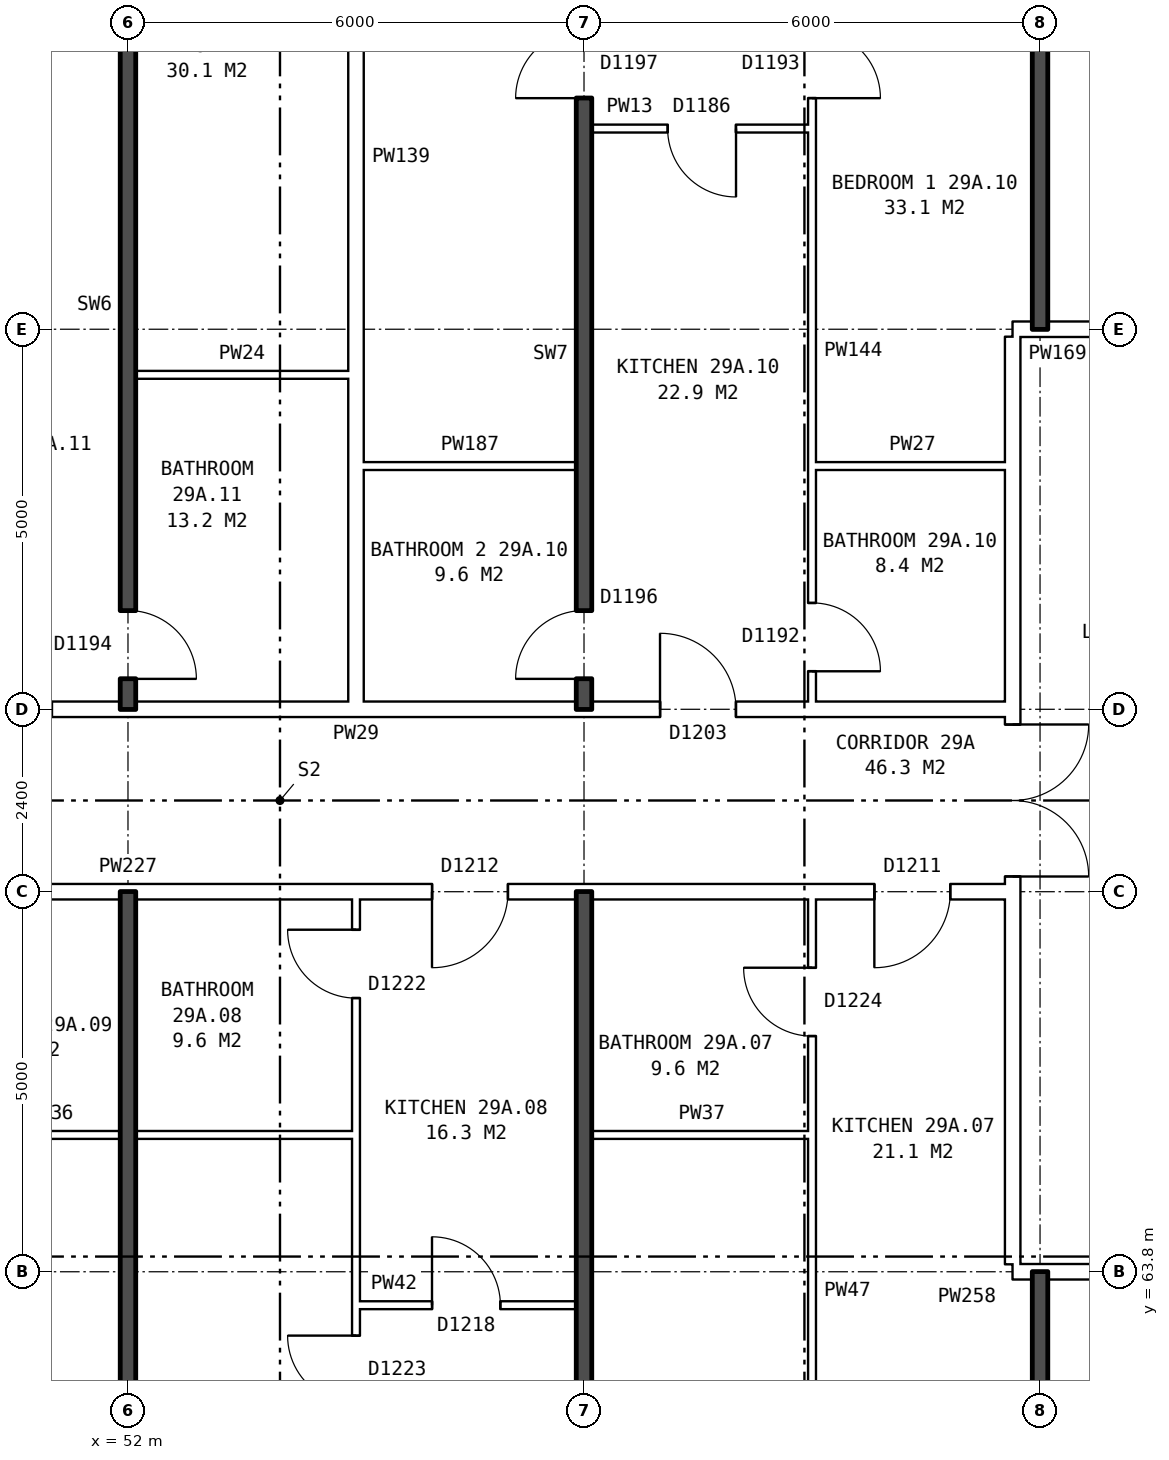
"""IFC4 building model, lengths in metres.
Left out: names, types, materials, properties, quantities, classifications, styles, units other than length and angle.
Written with IfcOpenShell. Run it as: python <this file> out.ifc"""

import sys

from ifc_helpers import new_model, si_unit, direction, frame, frame_2d, origin, place, context, subcontext, project, spatial, rectangle, extrude, element, fill, save


model = new_model("IFC4")
c1 = context("Model", 3, precision=1e-05, world=origin(), true_north=direction((0.0, 1.0)))
c2 = subcontext(c1, "Body", "Model", "MODEL_VIEW")
j1 = project(units=[si_unit("LENGTHUNIT", "METRE"), si_unit("PLANEANGLEUNIT", "RADIAN")], contexts=[c1])
p1 = place(None, origin())
s1 = spatial("IfcSite", under=j1, at=p1, CompositionType="ELEMENT")
p2 = place(p1, origin())
s2 = spatial("IfcBuilding", under=s1, at=p2, CompositionType="ELEMENT")
p3 = place(p2, frame((0.0, 0.0, 105.7)))
s3 = spatial("IfcBuildingStorey", under=s2, at=p3, CompositionType="ELEMENT", Elevation=105.7)
p4 = place(p3, frame((63.64, 63.9, 0.0), z_axis=(0.0, 0.0, 1.0), x_axis=(0.0, 1.0, 0.0)))
e1 = element("IfcWall", 1, at=p4, inside=s3, PredefinedType="PARTITIONING", context=c2, shape_type="SweptSolid", body=[
    extrude(rectangle(XDim=12.2, YDim=0.2, at=frame_2d((6.1, 0.0))), origin(), (0.0, 0.0, 1.0), 2.85),
])
p5 = place(p4, frame((5.1, 0.0, 0.0)))
e2 = element("IfcOpeningElement", 2, at=p5, cuts=e1, PredefinedType="OPENING", context=c2, shape_type="SweptSolid", body=[
    extrude(rectangle(XDim=2.0, YDim=2.1, at=frame_2d((1.0, 1.05))), frame((0.0, 0.11, 0.0), z_axis=(0.0, -1.0, 0.0), x_axis=(1.0, 0.0, 0.0)), (0.0, 0.0, 1.0), 0.22),
])
p6 = place(p3, frame((55.0, 63.36, 0.0), z_axis=(0.0, 0.0, 1.0), x_axis=(1.0, 0.0, 0.0)))
e3 = element("IfcWall", 3, at=p6, inside=s3, PredefinedType="PARTITIONING", context=c2, shape_type="SweptSolid", body=[
    extrude(rectangle(XDim=2.9, YDim=0.1, at=frame_2d((1.45, 0.0))), origin(), (0.0, 0.0, 1.0), 2.85),
])
p7 = place(p6, frame((1.0, 0.0, 0.0)))
e4 = element("IfcOpeningElement", 4, at=p7, cuts=e3, PredefinedType="OPENING", context=c2, shape_type="SweptSolid", body=[
    extrude(rectangle(XDim=0.9, YDim=2.1, at=frame_2d((0.45, 1.05))), frame((0.0, 0.06, 0.0), z_axis=(0.0, -1.0, 0.0), x_axis=(1.0, 0.0, 0.0)), (0.0, 0.0, 1.0), 0.12),
])
p8 = place(p3, frame((63.64, 63.8, 0.0), z_axis=(0.0, 0.0, 1.0), x_axis=(1.0, 0.0, 0.0)))
e5 = element("IfcWall", 5, at=p8, inside=s3, PredefinedType="PARTITIONING", context=c2, shape_type="SweptSolid", body=[
    extrude(rectangle(XDim=3.0, YDim=0.2, at=frame_2d((1.5, 0.0))), origin(), (0.0, 0.0, 1.0), 2.85),
])
p9 = place(p8, frame((1.18, 0.0, 0.0)))
e6 = element("IfcOpeningElement", 6, at=p9, cuts=e5, PredefinedType="OPENING", context=c2, shape_type="SweptSolid", body=[
    extrude(rectangle(XDim=1.0, YDim=2.1, at=frame_2d((0.5, 1.05))), frame((0.0, 0.11, 0.0), z_axis=(0.0, -1.0, 0.0), x_axis=(1.0, 0.0, 0.0)), (0.0, 0.0, 1.0), 0.22),
])
p10 = place(p3, frame((49.0, 65.6, 0.0), z_axis=(0.0, 0.0, 1.0), x_axis=(1.0, 0.0, 0.0)))
e7 = element("IfcWall", 7, at=p10, inside=s3, PredefinedType="PARTITIONING", context=c2, shape_type="SweptSolid", body=[
    extrude(rectangle(XDim=6.0, YDim=0.1, at=frame_2d((3.0, 0.0))), origin(), (0.0, 0.0, 1.0), 2.85),
])
p11 = place(p3, frame((58.1, 65.6, 0.0), z_axis=(0.0, 0.0, 1.0), x_axis=(1.0, 0.0, 0.0)))
e8 = element("IfcWall", 8, at=p11, inside=s3, PredefinedType="PARTITIONING", context=c2, shape_type="SweptSolid", body=[
    extrude(rectangle(XDim=2.9, YDim=0.1, at=frame_2d((1.45, 0.0))), origin(), (0.0, 0.0, 1.0), 2.85),
])
p12 = place(p3, frame((44.36, 68.8, 0.0), z_axis=(0.0, 0.0, 1.0), x_axis=(1.0, 0.0, 0.0)))
e9 = element("IfcWall", 9, at=p12, inside=s3, PredefinedType="PARTITIONING", context=c2, shape_type="SweptSolid", body=[
    extrude(rectangle(XDim=19.28, YDim=0.2, at=frame_2d((9.64, 0.0))), origin(), (0.0, 0.0, 1.0), 2.85),
])
p13 = place(p12, frame((17.46, 0.0, 0.0)))
e10 = element("IfcOpeningElement", 10, at=p13, cuts=e9, PredefinedType="OPENING", context=c2, shape_type="SweptSolid", body=[
    extrude(rectangle(XDim=1.0, YDim=2.1, at=frame_2d((0.5, 1.05))), frame((0.0, 0.11, 0.0), z_axis=(0.0, -1.0, 0.0), x_axis=(1.0, 0.0, 0.0)), (0.0, 0.0, 1.0), 0.22),
])
p14 = place(p12, frame((11.64, 0.0, 0.0)))
e11 = element("IfcOpeningElement", 11, at=p14, cuts=e9, PredefinedType="OPENING", context=c2, shape_type="SweptSolid", body=[
    extrude(rectangle(XDim=1.0, YDim=2.1, at=frame_2d((0.5, 1.05))), frame((0.0, 0.11, 0.0), z_axis=(0.0, -1.0, 0.0), x_axis=(1.0, 0.0, 0.0)), (0.0, 0.0, 1.0), 0.22),
])
p15 = place(p12, frame((2.64, 0.0, 0.0)))
e12 = element("IfcOpeningElement", 12, at=p15, cuts=e9, PredefinedType="OPENING", context=c2, shape_type="SweptSolid", body=[
    extrude(rectangle(XDim=1.0, YDim=2.1, at=frame_2d((0.5, 1.05))), frame((0.0, 0.11, 0.0), z_axis=(0.0, -1.0, 0.0), x_axis=(1.0, 0.0, 0.0)), (0.0, 0.0, 1.0), 0.22),
])
p16 = place(p3, frame((44.36, 71.2, 0.0), z_axis=(0.0, 0.0, 1.0), x_axis=(1.0, 0.0, 0.0)))
e13 = element("IfcWall", 13, at=p16, inside=s3, PredefinedType="PARTITIONING", context=c2, shape_type="SweptSolid", body=[
    extrude(rectangle(XDim=19.28, YDim=0.2, at=frame_2d((9.64, 0.0))), origin(), (0.0, 0.0, 1.0), 2.85),
])
p17 = place(p16, frame((14.64, 0.0, 0.0)))
e14 = element("IfcOpeningElement", 14, at=p17, cuts=e13, PredefinedType="OPENING", context=c2, shape_type="SweptSolid", body=[
    extrude(rectangle(XDim=1.0, YDim=2.1, at=frame_2d((0.5, 1.05))), frame((0.0, 0.11, 0.0), z_axis=(0.0, -1.0, 0.0), x_axis=(1.0, 0.0, 0.0)), (0.0, 0.0, 1.0), 0.22),
])
p18 = place(p16, frame((5.64, 0.0, 0.0)))
e15 = element("IfcOpeningElement", 15, at=p18, cuts=e13, PredefinedType="OPENING", context=c2, shape_type="SweptSolid", body=[
    extrude(rectangle(XDim=1.0, YDim=2.1, at=frame_2d((0.5, 1.05))), frame((0.0, 0.11, 0.0), z_axis=(0.0, -1.0, 0.0), x_axis=(1.0, 0.0, 0.0)), (0.0, 0.0, 1.0), 0.22),
])
p19 = place(p3, frame((55.1, 74.4, 0.0), z_axis=(0.0, 0.0, 1.0), x_axis=(1.0, 0.0, 0.0)))
e16 = element("IfcWall", 16, at=p19, inside=s3, PredefinedType="PARTITIONING", context=c2, shape_type="SweptSolid", body=[
    extrude(rectangle(XDim=2.8, YDim=0.1, at=frame_2d((1.4, 0.0))), origin(), (0.0, 0.0, 1.0), 2.85),
])
p20 = place(p3, frame((61.0, 74.4, 0.0), z_axis=(0.0, 0.0, 1.0), x_axis=(1.0, 0.0, 0.0)))
e17 = element("IfcWall", 17, at=p20, inside=s3, PredefinedType="PARTITIONING", context=c2, shape_type="SweptSolid", body=[
    extrude(rectangle(XDim=2.64, YDim=0.1, at=frame_2d((1.32, 0.0))), origin(), (0.0, 0.0, 1.0), 2.85),
])
p21 = place(p3, frame((52.1, 75.6, 0.0), z_axis=(0.0, 0.0, 1.0), x_axis=(1.0, 0.0, 0.0)))
e18 = element("IfcWall", 18, at=p21, inside=s3, PredefinedType="PARTITIONING", context=c2, shape_type="SweptSolid", body=[
    extrude(rectangle(XDim=2.8, YDim=0.1, at=frame_2d((1.4, 0.0))), origin(), (0.0, 0.0, 1.0), 2.85),
])
p22 = place(p3, frame((63.64, 76.2, 0.0), z_axis=(0.0, 0.0, 1.0), x_axis=(1.0, 0.0, 0.0)))
e19 = element("IfcWall", 19, at=p22, inside=s3, PredefinedType="PARTITIONING", context=c2, shape_type="SweptSolid", body=[
    extrude(rectangle(XDim=3.0, YDim=0.2, at=frame_2d((1.5, 0.0))), origin(), (0.0, 0.0, 1.0), 2.85),
])
p23 = place(p22, frame((1.18, 0.0, 0.0)))
e20 = element("IfcOpeningElement", 20, at=p23, cuts=e19, PredefinedType="OPENING", context=c2, shape_type="SweptSolid", body=[
    extrude(rectangle(XDim=1.0, YDim=2.1, at=frame_2d((0.5, 1.05))), frame((0.0, 0.11, 0.0), z_axis=(0.0, -1.0, 0.0), x_axis=(1.0, 0.0, 0.0)), (0.0, 0.0, 1.0), 0.22),
])
p24 = place(p3, frame((58.1, 78.84, 0.0), z_axis=(0.0, 0.0, 1.0), x_axis=(1.0, 0.0, 0.0)))
e21 = element("IfcWall", 21, at=p24, inside=s3, PredefinedType="PARTITIONING", context=c2, shape_type="SweptSolid", body=[
    extrude(rectangle(XDim=2.9, YDim=0.1, at=frame_2d((1.45, 0.0))), origin(), (0.0, 0.0, 1.0), 2.85),
])
p25 = place(p24, frame((1.0, 0.0, 0.0)))
e22 = element("IfcOpeningElement", 22, at=p25, cuts=e21, PredefinedType="OPENING", context=c2, shape_type="SweptSolid", body=[
    extrude(rectangle(XDim=0.9, YDim=2.1, at=frame_2d((0.45, 1.05))), frame((0.0, 0.06, 0.0), z_axis=(0.0, -1.0, 0.0), x_axis=(1.0, 0.0, 0.0)), (0.0, 0.0, 1.0), 0.12),
])
p26 = place(p3, frame((52.0, 54.36, 0.0), z_axis=(0.0, 0.0, 1.0), x_axis=(0.0, 1.0, 0.0)))
e23 = element("IfcWall", 23, at=p26, inside=s3, PredefinedType="SOLIDWALL", context=c2, shape_type="SweptSolid", body=[
    extrude(rectangle(XDim=14.44, YDim=0.2, at=frame_2d((7.22, 0.0))), origin(), (0.0, 0.0, 1.0), 2.85),
])
p27 = place(p3, frame((52.0, 71.2, 0.0), z_axis=(0.0, 0.0, 1.0), x_axis=(0.0, 1.0, 0.0)))
e24 = element("IfcWall", 24, at=p27, inside=s3, PredefinedType="SOLIDWALL", context=c2, shape_type="SweptSolid", body=[
    extrude(rectangle(XDim=14.44, YDim=0.2, at=frame_2d((7.22, 0.0))), origin(), (0.0, 0.0, 1.0), 2.85),
])
p28 = place(p27, frame((9.34, 0.0, 0.0)))
e25 = element("IfcOpeningElement", 25, at=p28, cuts=e24, PredefinedType="OPENING", context=c2, shape_type="SweptSolid", body=[
    extrude(rectangle(XDim=0.9, YDim=2.1, at=frame_2d((0.45, 1.05))), frame((0.0, 0.11, 0.0), z_axis=(0.0, -1.0, 0.0), x_axis=(1.0, 0.0, 0.0)), (0.0, 0.0, 1.0), 0.22),
])
p29 = place(p27, frame((0.4, 0.0, 0.0)))
e26 = element("IfcOpeningElement", 26, at=p29, cuts=e24, PredefinedType="OPENING", context=c2, shape_type="SweptSolid", body=[
    extrude(rectangle(XDim=0.9, YDim=2.1, at=frame_2d((0.45, 1.05))), frame((0.0, 0.11, 0.0), z_axis=(0.0, -1.0, 0.0), x_axis=(1.0, 0.0, 0.0)), (0.0, 0.0, 1.0), 0.22),
])
p30 = place(p3, frame((55.0, 54.36, 0.0), z_axis=(0.0, 0.0, 1.0), x_axis=(0.0, 1.0, 0.0)))
e27 = element("IfcWall", 27, at=p30, inside=s3, PredefinedType="PARTITIONING", context=c2, shape_type="SweptSolid", body=[
    extrude(rectangle(XDim=14.34, YDim=0.1, at=frame_2d((7.17, 0.0))), origin(), (0.0, 0.0, 1.0), 2.85),
])
p31 = place(p30, frame((7.7, 0.0, 0.0)))
e28 = element("IfcOpeningElement", 28, at=p31, cuts=e27, PredefinedType="OPENING", context=c2, shape_type="SweptSolid", body=[
    extrude(rectangle(XDim=0.9, YDim=2.1, at=frame_2d((0.45, 1.05))), frame((0.0, 0.06, 0.0), z_axis=(0.0, -1.0, 0.0), x_axis=(1.0, 0.0, 0.0)), (0.0, 0.0, 1.0), 0.12),
])
p32 = place(p30, frame((13.04, 0.0, 0.0)))
e29 = element("IfcOpeningElement", 29, at=p32, cuts=e27, PredefinedType="OPENING", context=c2, shape_type="SweptSolid", body=[
    extrude(rectangle(XDim=0.9, YDim=2.1, at=frame_2d((0.45, 1.05))), frame((0.0, 0.06, 0.0), z_axis=(0.0, -1.0, 0.0), x_axis=(1.0, 0.0, 0.0)), (0.0, 0.0, 1.0), 0.12),
])
p33 = place(p3, frame((55.0, 71.3, 0.0), z_axis=(0.0, 0.0, 1.0), x_axis=(0.0, 1.0, 0.0)))
e30 = element("IfcWall", 30, at=p33, inside=s3, PredefinedType="PARTITIONING", context=c2, shape_type="SweptSolid", body=[
    extrude(rectangle(XDim=14.34, YDim=0.2, at=frame_2d((7.17, 0.0))), origin(), (0.0, 0.0, 1.0), 2.85),
])
p34 = place(p3, frame((58.0, 54.36, 0.0), z_axis=(0.0, 0.0, 1.0), x_axis=(0.0, 1.0, 0.0)))
e31 = element("IfcWall", 31, at=p34, inside=s3, PredefinedType="SOLIDWALL", context=c2, shape_type="SweptSolid", body=[
    extrude(rectangle(XDim=14.44, YDim=0.2, at=frame_2d((7.22, 0.0))), origin(), (0.0, 0.0, 1.0), 2.85),
])
p35 = place(p3, frame((58.0, 71.2, 0.0), z_axis=(0.0, 0.0, 1.0), x_axis=(0.0, 1.0, 0.0)))
e32 = element("IfcWall", 32, at=p35, inside=s3, PredefinedType="SOLIDWALL", context=c2, shape_type="SweptSolid", body=[
    extrude(rectangle(XDim=14.44, YDim=0.2, at=frame_2d((7.22, 0.0))), origin(), (0.0, 0.0, 1.0), 2.85),
])
p36 = place(p35, frame((8.04, 0.0, 0.0)))
e33 = element("IfcOpeningElement", 33, at=p36, cuts=e32, PredefinedType="OPENING", context=c2, shape_type="SweptSolid", body=[
    extrude(rectangle(XDim=0.9, YDim=2.1, at=frame_2d((0.45, 1.05))), frame((0.0, 0.11, 0.0), z_axis=(0.0, -1.0, 0.0), x_axis=(1.0, 0.0, 0.0)), (0.0, 0.0, 1.0), 0.22),
])
p37 = place(p35, frame((0.4, 0.0, 0.0)))
e34 = element("IfcOpeningElement", 34, at=p37, cuts=e32, PredefinedType="OPENING", context=c2, shape_type="SweptSolid", body=[
    extrude(rectangle(XDim=0.9, YDim=2.1, at=frame_2d((0.45, 1.05))), frame((0.0, 0.11, 0.0), z_axis=(0.0, -1.0, 0.0), x_axis=(1.0, 0.0, 0.0)), (0.0, 0.0, 1.0), 0.22),
])
p38 = place(p3, frame((61.0, 54.36, 0.0), z_axis=(0.0, 0.0, 1.0), x_axis=(0.0, 1.0, 0.0)))
e35 = element("IfcWall", 35, at=p38, inside=s3, PredefinedType="PARTITIONING", context=c2, shape_type="SweptSolid", body=[
    extrude(rectangle(XDim=14.34, YDim=0.1, at=frame_2d((7.17, 0.0))), origin(), (0.0, 0.0, 1.0), 2.85),
])
p39 = place(p38, frame((5.5, 0.0, 0.0)))
e36 = element("IfcOpeningElement", 36, at=p39, cuts=e35, PredefinedType="OPENING", context=c2, shape_type="SweptSolid", body=[
    extrude(rectangle(XDim=0.9, YDim=2.1, at=frame_2d((0.45, 1.05))), frame((0.0, 0.06, 0.0), z_axis=(0.0, -1.0, 0.0), x_axis=(1.0, 0.0, 0.0)), (0.0, 0.0, 1.0), 0.12),
])
p40 = place(p38, frame((12.54, 0.0, 0.0)))
e37 = element("IfcOpeningElement", 37, at=p40, cuts=e35, PredefinedType="OPENING", context=c2, shape_type="SweptSolid", body=[
    extrude(rectangle(XDim=0.9, YDim=2.1, at=frame_2d((0.45, 1.05))), frame((0.0, 0.06, 0.0), z_axis=(0.0, -1.0, 0.0), x_axis=(1.0, 0.0, 0.0)), (0.0, 0.0, 1.0), 0.12),
])
p41 = place(p3, frame((61.0, 71.3, 0.0), z_axis=(0.0, 0.0, 1.0), x_axis=(0.0, 1.0, 0.0)))
e38 = element("IfcWall", 38, at=p41, inside=s3, PredefinedType="PARTITIONING", context=c2, shape_type="SweptSolid", body=[
    extrude(rectangle(XDim=14.34, YDim=0.1, at=frame_2d((7.17, 0.0))), origin(), (0.0, 0.0, 1.0), 2.85),
])
p42 = place(p41, frame((7.94, 0.0, 0.0)))
e39 = element("IfcOpeningElement", 39, at=p42, cuts=e38, PredefinedType="OPENING", context=c2, shape_type="SweptSolid", body=[
    extrude(rectangle(XDim=0.9, YDim=2.1, at=frame_2d((0.45, 1.05))), frame((0.0, 0.06, 0.0), z_axis=(0.0, -1.0, 0.0), x_axis=(1.0, 0.0, 0.0)), (0.0, 0.0, 1.0), 0.12),
])
p43 = place(p41, frame((0.4, 0.0, 0.0)))
e40 = element("IfcOpeningElement", 40, at=p43, cuts=e38, PredefinedType="OPENING", context=c2, shape_type="SweptSolid", body=[
    extrude(rectangle(XDim=0.9, YDim=2.1, at=frame_2d((0.45, 1.05))), frame((0.0, 0.06, 0.0), z_axis=(0.0, -1.0, 0.0), x_axis=(1.0, 0.0, 0.0)), (0.0, 0.0, 1.0), 0.12),
])
for number, where, z_axis, x_axis in (
    (41, (64.0, 54.36, 0.0), (0.0, 0.0, 1.0), (0.0, 1.0, 0.0)),
    (42, (64.0, 76.2, 0.0), (0.0, 0.0, 1.0), (0.0, 1.0, 0.0)),
):
    element("IfcWall", number, at=place(p3, frame(where, z_axis=z_axis, x_axis=x_axis)), inside=s3, PredefinedType="SOLIDWALL", context=c2, shape_type="SweptSolid", body=[
        extrude(rectangle(XDim=9.44, YDim=0.2, at=frame_2d((4.72, 0.0))), origin(), (0.0, 0.0, 1.0), 2.85),
    ])
p44 = place(p5, frame((2.0, 0.0, 0.0), z_axis=(0.0, 0.0, 1.0), x_axis=(-1.0, 0.0, 0.0)))
e43 = element("IfcDoor", 43, at=p44, inside=s3, OperationType="DOUBLE_DOOR_SINGLE_SWING", PredefinedType="DOOR", context=c2, shape_type="SweptSolid", body=[
    extrude(rectangle(XDim=2.0, YDim=2.1, at=frame_2d((1.0, 1.05))), frame((0.0, 0.025, 0.0), z_axis=(0.0, -1.0, 0.0), x_axis=(1.0, 0.0, 0.0)), (0.0, 0.0, 1.0), 0.05),
])
fill(e2, e43)
p45 = place(p13, frame((1.0, 0.0, 0.0), z_axis=(0.0, 0.0, 1.0), x_axis=(-1.0, 0.0, 0.0)))
e44 = element("IfcDoor", 44, at=p45, inside=s3, OperationType="SINGLE_SWING_RIGHT", PredefinedType="DOOR", context=c2, shape_type="SweptSolid", body=[
    extrude(rectangle(XDim=1.0, YDim=2.1, at=frame_2d((0.5, 1.05))), frame((0.0, 0.025, 0.0), z_axis=(0.0, -1.0, 0.0), x_axis=(1.0, 0.0, 0.0)), (0.0, 0.0, 1.0), 0.05),
])
fill(e10, e44)
p46 = place(p40, origin())
e45 = element("IfcDoor", 45, at=p46, inside=s3, OperationType="SINGLE_SWING_RIGHT", PredefinedType="DOOR", context=c2, shape_type="SweptSolid", body=[
    extrude(rectangle(XDim=0.9, YDim=2.1, at=frame_2d((0.45, 1.05))), frame((0.0, 0.025, 0.0), z_axis=(0.0, -1.0, 0.0), x_axis=(1.0, 0.0, 0.0)), (0.0, 0.0, 1.0), 0.05),
])
fill(e37, e45)
p47 = place(p31, origin())
e46 = element("IfcDoor", 46, at=p47, inside=s3, OperationType="SINGLE_SWING_RIGHT", PredefinedType="DOOR", context=c2, shape_type="SweptSolid", body=[
    extrude(rectangle(XDim=0.9, YDim=2.1, at=frame_2d((0.45, 1.05))), frame((0.0, 0.025, 0.0), z_axis=(0.0, -1.0, 0.0), x_axis=(1.0, 0.0, 0.0)), (0.0, 0.0, 1.0), 0.05),
])
fill(e28, e46)
p48 = place(p14, frame((1.0, 0.0, 0.0), z_axis=(0.0, 0.0, 1.0), x_axis=(-1.0, 0.0, 0.0)))
e47 = element("IfcDoor", 47, at=p48, inside=s3, OperationType="SINGLE_SWING_RIGHT", PredefinedType="DOOR", context=c2, shape_type="SweptSolid", body=[
    extrude(rectangle(XDim=1.0, YDim=2.1, at=frame_2d((0.5, 1.05))), frame((0.0, 0.025, 0.0), z_axis=(0.0, -1.0, 0.0), x_axis=(1.0, 0.0, 0.0)), (0.0, 0.0, 1.0), 0.05),
])
fill(e11, e47)
p49 = place(p7, origin())
e48 = element("IfcDoor", 48, at=p49, inside=s3, OperationType="SINGLE_SWING_LEFT", PredefinedType="DOOR", context=c2, shape_type="SweptSolid", body=[
    extrude(rectangle(XDim=0.9, YDim=2.1, at=frame_2d((0.45, 1.05))), frame((0.0, 0.025, 0.0), z_axis=(0.0, -1.0, 0.0), x_axis=(1.0, 0.0, 0.0)), (0.0, 0.0, 1.0), 0.05),
])
fill(e4, e48)
p50 = place(p32, origin())
e49 = element("IfcDoor", 49, at=p50, inside=s3, OperationType="SINGLE_SWING_RIGHT", PredefinedType="DOOR", context=c2, shape_type="SweptSolid", body=[
    extrude(rectangle(XDim=0.9, YDim=2.1, at=frame_2d((0.45, 1.05))), frame((0.0, 0.025, 0.0), z_axis=(0.0, -1.0, 0.0), x_axis=(1.0, 0.0, 0.0)), (0.0, 0.0, 1.0), 0.05),
])
fill(e29, e49)
p51 = place(p42, frame((0.9, 0.0, 0.0), z_axis=(0.0, 0.0, 1.0), x_axis=(-1.0, 0.0, 0.0)))
e50 = element("IfcDoor", 50, at=p51, inside=s3, OperationType="SINGLE_SWING_RIGHT", PredefinedType="DOOR", context=c2, shape_type="SweptSolid", body=[
    extrude(rectangle(XDim=0.9, YDim=2.1, at=frame_2d((0.45, 1.05))), frame((0.0, 0.025, 0.0), z_axis=(0.0, -1.0, 0.0), x_axis=(1.0, 0.0, 0.0)), (0.0, 0.0, 1.0), 0.05),
])
fill(e39, e50)
p52 = place(p36, origin())
e51 = element("IfcDoor", 51, at=p52, inside=s3, OperationType="SINGLE_SWING_LEFT", PredefinedType="DOOR", context=c2, shape_type="SweptSolid", body=[
    extrude(rectangle(XDim=0.9, YDim=2.1, at=frame_2d((0.45, 1.05))), frame((0.0, 0.025, 0.0), z_axis=(0.0, -1.0, 0.0), x_axis=(1.0, 0.0, 0.0)), (0.0, 0.0, 1.0), 0.05),
])
fill(e33, e51)
p53 = place(p17, origin())
e52 = element("IfcDoor", 52, at=p53, inside=s3, OperationType="SINGLE_SWING_LEFT", PredefinedType="DOOR", context=c2, shape_type="SweptSolid", body=[
    extrude(rectangle(XDim=1.0, YDim=2.1, at=frame_2d((0.5, 1.05))), frame((0.0, 0.025, 0.0), z_axis=(0.0, -1.0, 0.0), x_axis=(1.0, 0.0, 0.0)), (0.0, 0.0, 1.0), 0.05),
])
fill(e14, e52)
p54 = place(p25, frame((0.9, 0.0, 0.0), z_axis=(0.0, 0.0, 1.0), x_axis=(-1.0, 0.0, 0.0)))
e53 = element("IfcDoor", 53, at=p54, inside=s3, OperationType="SINGLE_SWING_LEFT", PredefinedType="DOOR", context=c2, shape_type="SweptSolid", body=[
    extrude(rectangle(XDim=0.9, YDim=2.1, at=frame_2d((0.45, 1.05))), frame((0.0, 0.025, 0.0), z_axis=(0.0, -1.0, 0.0), x_axis=(1.0, 0.0, 0.0)), (0.0, 0.0, 1.0), 0.05),
])
fill(e22, e53)
p55 = place(p43, frame((0.9, 0.0, 0.0), z_axis=(0.0, 0.0, 1.0), x_axis=(-1.0, 0.0, 0.0)))
e54 = element("IfcDoor", 54, at=p55, inside=s3, OperationType="SINGLE_SWING_RIGHT", PredefinedType="DOOR", context=c2, shape_type="SweptSolid", body=[
    extrude(rectangle(XDim=0.9, YDim=2.1, at=frame_2d((0.45, 1.05))), frame((0.0, 0.025, 0.0), z_axis=(0.0, -1.0, 0.0), x_axis=(1.0, 0.0, 0.0)), (0.0, 0.0, 1.0), 0.05),
])
fill(e40, e54)
p56 = place(p37, origin())
e55 = element("IfcDoor", 55, at=p56, inside=s3, OperationType="SINGLE_SWING_LEFT", PredefinedType="DOOR", context=c2, shape_type="SweptSolid", body=[
    extrude(rectangle(XDim=0.9, YDim=2.1, at=frame_2d((0.45, 1.05))), frame((0.0, 0.025, 0.0), z_axis=(0.0, -1.0, 0.0), x_axis=(1.0, 0.0, 0.0)), (0.0, 0.0, 1.0), 0.05),
])
fill(e34, e55)
p57 = place(p29, frame((0.9, 0.0, 0.0), z_axis=(0.0, 0.0, 1.0), x_axis=(-1.0, 0.0, 0.0)))
e56 = element("IfcDoor", 56, at=p57, inside=s3, OperationType="SINGLE_SWING_RIGHT", PredefinedType="DOOR", context=c2, shape_type="SweptSolid", body=[
    extrude(rectangle(XDim=0.9, YDim=2.1, at=frame_2d((0.45, 1.05))), frame((0.0, 0.025, 0.0), z_axis=(0.0, -1.0, 0.0), x_axis=(1.0, 0.0, 0.0)), (0.0, 0.0, 1.0), 0.05),
])
fill(e26, e56)
save(model, sys.argv[1])
